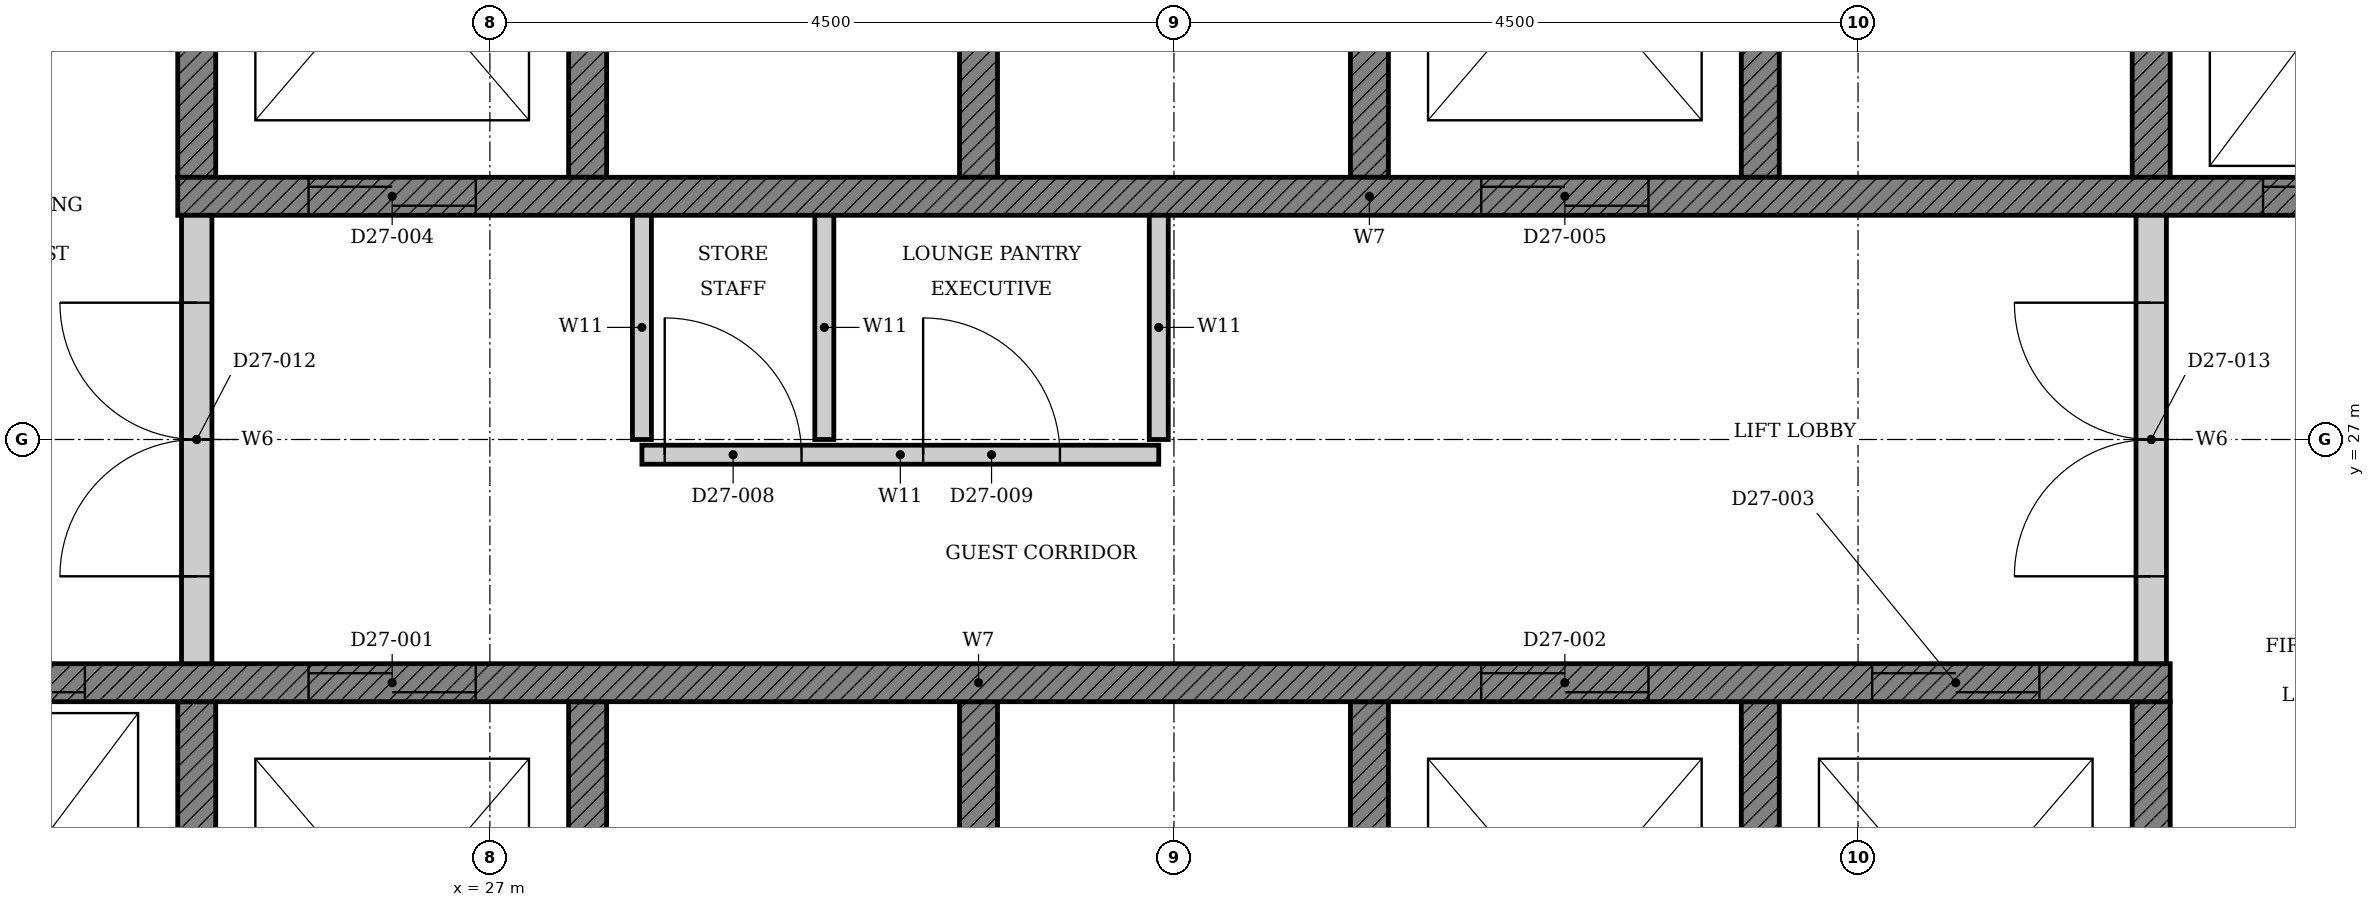
"""IFC4 building model, lengths in metres.
Left out: names, types, materials, properties, quantities, classifications, styles, units other than length and angle.
Written with IfcOpenShell. Run it as: python <this file> out.ifc"""

import sys

from ifc_helpers import new_model, si_unit, direction, frame, frame_2d, origin, place, context, subcontext, project, spatial, polyline, rectangle, outline, extrude, element, fill, save


model = new_model("IFC4")
c1 = context("Model", 3, precision=1e-05, world=origin(), true_north=direction((0.0, 1.0)))
c2 = subcontext(c1, "Body", "Model", "MODEL_VIEW")
j1 = project(units=[si_unit("LENGTHUNIT", "METRE"), si_unit("PLANEANGLEUNIT", "RADIAN")], contexts=[c1])
p1 = place(None, origin())
s1 = spatial("IfcSite", under=j1, at=p1, CompositionType="ELEMENT")
p2 = place(p1, origin())
s2 = spatial("IfcBuilding", under=s1, at=p2, CompositionType="ELEMENT")
p3 = place(p2, frame((0.0, 0.0, 111.6)))
s3 = spatial("IfcBuildingStorey", under=s2, at=p3, CompositionType="ELEMENT", Elevation=111.6)
p4 = place(p3, origin())
e1 = element("IfcWall", 1, at=p4, inside=s3, PredefinedType="SHEAR", context=c2, shape_type="SweptSolid", body=[
    extrude(outline(polyline([(22.375, 22.35), (38.053, 22.35), (38.053, 25.275), (37.803, 25.275), (37.803, 22.65), (35.482, 22.65), (35.482, 25.275), (35.232, 25.275), (35.232, 22.65), (32.911, 22.65), (32.911, 25.275), (32.661, 25.275), (32.661, 22.65), (30.339, 22.65), (30.339, 25.275), (30.089, 25.275), (30.089, 22.65), (27.768, 22.65), (27.768, 25.275), (27.518, 25.275), (27.518, 22.65), (25.197, 22.65), (25.197, 25.275), (24.947, 25.275), (24.947, 22.65), (22.625, 22.65), (22.625, 25.275), (22.375, 25.275), (22.375, 22.35)])), origin(), (0.0, 0.0, 1.0), 3.3),
])
p5 = place(p3, origin())
e2 = element("IfcWall", 2, at=p5, inside=s3, PredefinedType="SHEAR", context=c2, shape_type="SweptSolid", body=[
    extrude(outline(polyline([(24.947, 28.725), (25.197, 28.725), (25.197, 31.35), (27.518, 31.35), (27.518, 28.725), (27.768, 28.725), (27.768, 31.35), (30.089, 31.35), (30.089, 28.725), (30.339, 28.725), (30.339, 31.35), (32.661, 31.35), (32.661, 28.725), (32.911, 28.725), (32.911, 31.35), (35.232, 31.35), (35.232, 28.725), (35.482, 28.725), (35.482, 31.35), (37.803, 31.35), (37.803, 28.725), (38.053, 28.725), (38.053, 31.35), (40.375, 31.35), (40.375, 28.725), (40.625, 28.725), (40.625, 31.65), (24.947, 31.65), (24.947, 28.725)])), origin(), (0.0, 0.0, 1.0), 3.3),
])
p6 = place(p3, frame((22.375, 25.4, 0.0), z_axis=(0.0, 0.0, 1.0), x_axis=(1.0, 0.0, 0.0)))
e3 = element("IfcWall", 3, at=p6, inside=s3, PredefinedType="SHEAR", context=c2, shape_type="SweptSolid", body=[
    extrude(rectangle(XDim=15.678, YDim=0.25, at=frame_2d((7.839, 0.0))), origin(), (0.0, 0.0, 1.0), 3.3),
])
p7 = place(p6, frame((3.432, 0.0, 0.0)))
e4 = element("IfcOpeningElement", 4, at=p7, cuts=e3, PredefinedType="OPENING", context=c2, shape_type="SweptSolid", body=[
    extrude(rectangle(XDim=1.1, YDim=2.1, at=frame_2d((0.55, 1.05))), frame((0.0, 0.135, 0.0), z_axis=(0.0, -1.0, 0.0), x_axis=(1.0, 0.0, 0.0)), (0.0, 0.0, 1.0), 0.27),
])
p8 = place(p6, frame((11.146, 0.0, 0.0)))
e5 = element("IfcOpeningElement", 5, at=p8, cuts=e3, PredefinedType="OPENING", context=c2, shape_type="SweptSolid", body=[
    extrude(rectangle(XDim=1.1, YDim=2.1, at=frame_2d((0.55, 1.05))), frame((0.0, 0.135, 0.0), z_axis=(0.0, -1.0, 0.0), x_axis=(1.0, 0.0, 0.0)), (0.0, 0.0, 1.0), 0.27),
])
p9 = place(p6, frame((13.718, 0.0, 0.0)))
e6 = element("IfcOpeningElement", 6, at=p9, cuts=e3, PredefinedType="OPENING", context=c2, shape_type="SweptSolid", body=[
    extrude(rectangle(XDim=1.1, YDim=2.1, at=frame_2d((0.55, 1.05))), frame((0.0, 0.135, 0.0), z_axis=(0.0, -1.0, 0.0), x_axis=(1.0, 0.0, 0.0)), (0.0, 0.0, 1.0), 0.27),
])
p10 = place(p6, frame((0.861, 0.0, 0.0)))
e7 = element("IfcOpeningElement", 7, at=p10, cuts=e3, PredefinedType="OPENING", context=c2, shape_type="SweptSolid", body=[
    extrude(rectangle(XDim=1.1, YDim=2.1, at=frame_2d((0.55, 1.05))), frame((0.0, 0.135, 0.0), z_axis=(0.0, -1.0, 0.0), x_axis=(1.0, 0.0, 0.0)), (0.0, 0.0, 1.0), 0.27),
])
p11 = place(p3, frame((24.947, 28.6, 0.0), z_axis=(0.0, 0.0, 1.0), x_axis=(1.0, 0.0, 0.0)))
e8 = element("IfcWall", 8, at=p11, inside=s3, PredefinedType="SHEAR", context=c2, shape_type="SweptSolid", body=[
    extrude(rectangle(XDim=15.678, YDim=0.25, at=frame_2d((7.839, 0.0))), origin(), (0.0, 0.0, 1.0), 3.3),
])
p12 = place(p11, frame((0.861, 0.0, 0.0)))
e9 = element("IfcOpeningElement", 9, at=p12, cuts=e8, PredefinedType="OPENING", context=c2, shape_type="SweptSolid", body=[
    extrude(rectangle(XDim=1.1, YDim=2.1, at=frame_2d((0.55, 1.05))), frame((0.0, 0.135, 0.0), z_axis=(0.0, -1.0, 0.0), x_axis=(1.0, 0.0, 0.0)), (0.0, 0.0, 1.0), 0.27),
])
p13 = place(p11, frame((8.575, 0.0, 0.0)))
e10 = element("IfcOpeningElement", 10, at=p13, cuts=e8, PredefinedType="OPENING", context=c2, shape_type="SweptSolid", body=[
    extrude(rectangle(XDim=1.1, YDim=2.1, at=frame_2d((0.55, 1.05))), frame((0.0, 0.135, 0.0), z_axis=(0.0, -1.0, 0.0), x_axis=(1.0, 0.0, 0.0)), (0.0, 0.0, 1.0), 0.27),
])
p14 = place(p11, frame((13.718, 0.0, 0.0)))
e11 = element("IfcOpeningElement", 11, at=p14, cuts=e8, PredefinedType="OPENING", context=c2, shape_type="SweptSolid", body=[
    extrude(rectangle(XDim=1.1, YDim=2.1, at=frame_2d((0.55, 1.05))), frame((0.0, 0.135, 0.0), z_axis=(0.0, -1.0, 0.0), x_axis=(1.0, 0.0, 0.0)), (0.0, 0.0, 1.0), 0.27),
])
p15 = place(p3, frame((28.0, 26.9, 0.0), z_axis=(0.0, 0.0, 1.0), x_axis=(1.0, 0.0, 0.0)))
e12 = element("IfcWall", 12, at=p15, inside=s3, PredefinedType="PARTITIONING", context=c2, shape_type="SweptSolid", body=[
    extrude(rectangle(XDim=3.4, YDim=0.125, at=frame_2d((1.7, 0.0))), origin(), (0.0, 0.0, 1.0), 3.3),
])
p16 = place(p15, frame((0.15, 0.0, 0.0)))
e13 = element("IfcOpeningElement", 13, at=p16, cuts=e12, PredefinedType="OPENING", context=c2, shape_type="SweptSolid", body=[
    extrude(rectangle(XDim=0.9, YDim=2.1, at=frame_2d((0.45, 1.05))), frame((0.0, 0.073, 0.0), z_axis=(0.0, -1.0, 0.0), x_axis=(1.0, 0.0, 0.0)), (0.0, 0.0, 1.0), 0.145),
])
p17 = place(p15, frame((1.85, 0.0, 0.0)))
e14 = element("IfcOpeningElement", 14, at=p17, cuts=e12, PredefinedType="OPENING", context=c2, shape_type="SweptSolid", body=[
    extrude(rectangle(XDim=0.9, YDim=2.1, at=frame_2d((0.45, 1.05))), frame((0.0, 0.073, 0.0), z_axis=(0.0, -1.0, 0.0), x_axis=(1.0, 0.0, 0.0)), (0.0, 0.0, 1.0), 0.145),
])
for number, where, z_axis, x_axis in (
    (15, (28.0, 28.475, 0.0), (0.0, 0.0, 1.0), (0.0, -1.0, 0.0)),
    (16, (29.2, 28.475, 0.0), (0.0, 0.0, 1.0), (0.0, -1.0, 0.0)),
    (17, (31.4, 28.475, 0.0), (0.0, 0.0, 1.0), (0.0, -1.0, 0.0)),
):
    element("IfcWall", number, at=place(p3, frame(where, z_axis=z_axis, x_axis=x_axis)), inside=s3, PredefinedType="PARTITIONING", context=c2, shape_type="SweptSolid", body=[
        extrude(rectangle(XDim=1.475, YDim=0.125, at=frame_2d((0.738, 0.0))), origin(), (0.0, 0.0, 1.0), 3.3),
    ])
p18 = place(p3, frame((25.072, 25.525, 0.0), z_axis=(0.0, 0.0, 1.0), x_axis=(0.0, 1.0, 0.0)))
e18 = element("IfcWall", 18, at=p18, inside=s3, PredefinedType="PARTITIONING", context=c2, shape_type="SweptSolid", body=[
    extrude(rectangle(XDim=2.95, YDim=0.2, at=frame_2d((1.475, 0.0))), origin(), (0.0, 0.0, 1.0), 3.3),
])
p19 = place(p18, frame((0.575, 0.0, 0.0)))
e19 = element("IfcOpeningElement", 19, at=p19, cuts=e18, PredefinedType="OPENING", context=c2, shape_type="SweptSolid", body=[
    extrude(rectangle(XDim=1.8, YDim=2.1, at=frame_2d((0.9, 1.05))), frame((0.0, 0.11, 0.0), z_axis=(0.0, -1.0, 0.0), x_axis=(1.0, 0.0, 0.0)), (0.0, 0.0, 1.0), 0.22),
])
p20 = place(p3, frame((37.928, 25.525, 0.0), z_axis=(0.0, 0.0, 1.0), x_axis=(0.0, 1.0, 0.0)))
e20 = element("IfcWall", 20, at=p20, inside=s3, PredefinedType="PARTITIONING", context=c2, shape_type="SweptSolid", body=[
    extrude(rectangle(XDim=2.95, YDim=0.2, at=frame_2d((1.475, 0.0))), origin(), (0.0, 0.0, 1.0), 3.3),
])
p21 = place(p20, frame((0.575, 0.0, 0.0)))
e21 = element("IfcOpeningElement", 21, at=p21, cuts=e20, PredefinedType="OPENING", context=c2, shape_type="SweptSolid", body=[
    extrude(rectangle(XDim=1.8, YDim=2.1, at=frame_2d((0.9, 1.05))), frame((0.0, 0.11, 0.0), z_axis=(0.0, -1.0, 0.0), x_axis=(1.0, 0.0, 0.0)), (0.0, 0.0, 1.0), 0.22),
])
p22 = place(p7, origin())
e22 = element("IfcDoor", 22, at=p22, inside=s3, OperationType="DOUBLE_DOOR_SLIDING", PredefinedType="DOOR", context=c2, shape_type="SweptSolid", body=[
    extrude(rectangle(XDim=1.1, YDim=2.1, at=frame_2d((0.55, 1.05))), frame((0.0, 0.025, 0.0), z_axis=(0.0, -1.0, 0.0), x_axis=(1.0, 0.0, 0.0)), (0.0, 0.0, 1.0), 0.05),
])
fill(e4, e22)
p23 = place(p8, origin())
e23 = element("IfcDoor", 23, at=p23, inside=s3, OperationType="DOUBLE_DOOR_SLIDING", PredefinedType="DOOR", context=c2, shape_type="SweptSolid", body=[
    extrude(rectangle(XDim=1.1, YDim=2.1, at=frame_2d((0.55, 1.05))), frame((0.0, 0.025, 0.0), z_axis=(0.0, -1.0, 0.0), x_axis=(1.0, 0.0, 0.0)), (0.0, 0.0, 1.0), 0.05),
])
fill(e5, e23)
p24 = place(p9, origin())
e24 = element("IfcDoor", 24, at=p24, inside=s3, OperationType="DOUBLE_DOOR_SLIDING", PredefinedType="DOOR", context=c2, shape_type="SweptSolid", body=[
    extrude(rectangle(XDim=1.1, YDim=2.1, at=frame_2d((0.55, 1.05))), frame((0.0, 0.025, 0.0), z_axis=(0.0, -1.0, 0.0), x_axis=(1.0, 0.0, 0.0)), (0.0, 0.0, 1.0), 0.05),
])
fill(e6, e24)
p25 = place(p12, origin())
e25 = element("IfcDoor", 25, at=p25, inside=s3, OperationType="DOUBLE_DOOR_SLIDING", PredefinedType="DOOR", context=c2, shape_type="SweptSolid", body=[
    extrude(rectangle(XDim=1.1, YDim=2.1, at=frame_2d((0.55, 1.05))), frame((0.0, 0.025, 0.0), z_axis=(0.0, -1.0, 0.0), x_axis=(1.0, 0.0, 0.0)), (0.0, 0.0, 1.0), 0.05),
])
fill(e9, e25)
p26 = place(p13, origin())
e26 = element("IfcDoor", 26, at=p26, inside=s3, OperationType="DOUBLE_DOOR_SLIDING", PredefinedType="DOOR", context=c2, shape_type="SweptSolid", body=[
    extrude(rectangle(XDim=1.1, YDim=2.1, at=frame_2d((0.55, 1.05))), frame((0.0, 0.025, 0.0), z_axis=(0.0, -1.0, 0.0), x_axis=(1.0, 0.0, 0.0)), (0.0, 0.0, 1.0), 0.05),
])
fill(e10, e26)
p27 = place(p10, origin())
e27 = element("IfcDoor", 27, at=p27, inside=s3, OperationType="DOUBLE_DOOR_SLIDING", PredefinedType="DOOR", context=c2, shape_type="SweptSolid", body=[
    extrude(rectangle(XDim=1.1, YDim=2.1, at=frame_2d((0.55, 1.05))), frame((0.0, 0.025, 0.0), z_axis=(0.0, -1.0, 0.0), x_axis=(1.0, 0.0, 0.0)), (0.0, 0.0, 1.0), 0.05),
])
fill(e7, e27)
p28 = place(p14, origin())
e28 = element("IfcDoor", 28, at=p28, inside=s3, OperationType="DOUBLE_DOOR_SLIDING", PredefinedType="DOOR", context=c2, shape_type="SweptSolid", body=[
    extrude(rectangle(XDim=1.1, YDim=2.1, at=frame_2d((0.55, 1.05))), frame((0.0, 0.025, 0.0), z_axis=(0.0, -1.0, 0.0), x_axis=(1.0, 0.0, 0.0)), (0.0, 0.0, 1.0), 0.05),
])
fill(e11, e28)
p29 = place(p16, origin())
e29 = element("IfcDoor", 29, at=p29, inside=s3, OperationType="SINGLE_SWING_LEFT", PredefinedType="DOOR", context=c2, shape_type="SweptSolid", body=[
    extrude(rectangle(XDim=0.9, YDim=2.1, at=frame_2d((0.45, 1.05))), frame((0.0, 0.025, 0.0), z_axis=(0.0, -1.0, 0.0), x_axis=(1.0, 0.0, 0.0)), (0.0, 0.0, 1.0), 0.05),
])
fill(e13, e29)
p30 = place(p17, origin())
e30 = element("IfcDoor", 30, at=p30, inside=s3, OperationType="SINGLE_SWING_LEFT", PredefinedType="DOOR", context=c2, shape_type="SweptSolid", body=[
    extrude(rectangle(XDim=0.9, YDim=2.1, at=frame_2d((0.45, 1.05))), frame((0.0, 0.025, 0.0), z_axis=(0.0, -1.0, 0.0), x_axis=(1.0, 0.0, 0.0)), (0.0, 0.0, 1.0), 0.05),
])
fill(e14, e30)
p31 = place(p19, origin())
e31 = element("IfcDoor", 31, at=p31, inside=s3, OperationType="DOUBLE_DOOR_SINGLE_SWING", PredefinedType="DOOR", context=c2, shape_type="SweptSolid", body=[
    extrude(rectangle(XDim=1.8, YDim=2.1, at=frame_2d((0.9, 1.05))), frame((0.0, 0.025, 0.0), z_axis=(0.0, -1.0, 0.0), x_axis=(1.0, 0.0, 0.0)), (0.0, 0.0, 1.0), 0.05),
])
fill(e19, e31)
p32 = place(p21, origin())
e32 = element("IfcDoor", 32, at=p32, inside=s3, OperationType="DOUBLE_DOOR_SINGLE_SWING", PredefinedType="DOOR", context=c2, shape_type="SweptSolid", body=[
    extrude(rectangle(XDim=1.8, YDim=2.1, at=frame_2d((0.9, 1.05))), frame((0.0, 0.025, 0.0), z_axis=(0.0, -1.0, 0.0), x_axis=(1.0, 0.0, 0.0)), (0.0, 0.0, 1.0), 0.05),
])
fill(e21, e32)
save(model, sys.argv[1])
